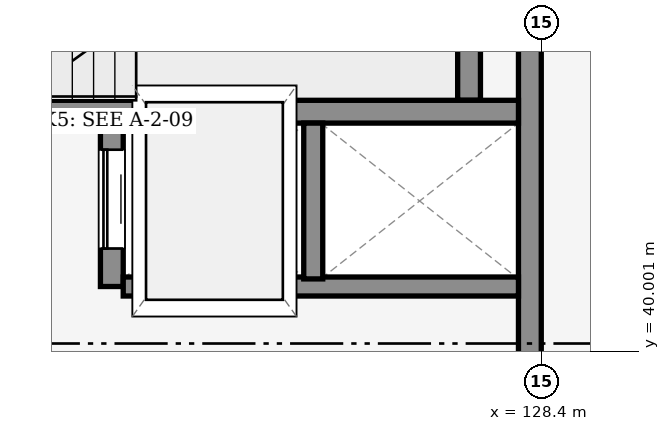
"""IFC4 building model, lengths in metres.
Left out: names, types, materials, properties, quantities, classifications, styles, units other than length and angle.
Written with IfcOpenShell. Run it as: python <this file> out.ifc"""

import sys

from ifc_helpers import new_model, si_unit, direction, frame, frame_2d, origin, place, context, subcontext, project, spatial, rectangle, extrude, element, fill, save


model = new_model("IFC4")
c1 = context("Model", 3, precision=1e-05, world=origin(), true_north=direction((0.0, 1.0)))
c2 = subcontext(c1, "Body", "Model", "MODEL_VIEW")
j1 = project(units=[si_unit("LENGTHUNIT", "METRE"), si_unit("PLANEANGLEUNIT", "RADIAN")], contexts=[c1])
p1 = place(None, origin())
s1 = spatial("IfcSite", under=j1, at=p1, CompositionType="ELEMENT")
p2 = place(p1, origin())
s2 = spatial("IfcBuilding", under=s1, at=p2, CompositionType="ELEMENT")
p3 = place(p2, origin())
s3 = spatial("IfcBuildingStorey", under=s2, at=p3, CompositionType="ELEMENT", Elevation=0.0)
p4 = place(p3, frame((128.25, 38.582, 0.0), z_axis=(0.0, 0.0, 1.0), x_axis=(0.0, 1.0, 0.0)))
e1 = element("IfcWall", 1, at=p4, inside=s3, PredefinedType="SHEAR", context=c2, shape_type="SweptSolid", body=[
    extrude(rectangle(XDim=8.036, YDim=0.3, at=frame_2d((4.018, 0.0))), origin(), (0.0, 0.0, 1.0), 5.18),
])
p5 = place(p3, frame((127.45, 43.3, 0.0), z_axis=(0.0, 0.0, 1.0), x_axis=(0.0, 1.0, 0.0)))
e2 = element("IfcWall", 2, at=p5, inside=s3, PredefinedType="SHEAR", context=c2, shape_type="SweptSolid", body=[
    extrude(rectangle(XDim=3.2, YDim=0.3, at=frame_2d((1.6, 0.0))), origin(), (0.0, 0.0, 1.0), 5.18),
])
p6 = place(p3, frame((116.7, 43.15, 0.0), z_axis=(0.0, 0.0, 1.0), x_axis=(1.0, 0.0, 0.0)))
e3 = element("IfcWall", 3, at=p6, inside=s3, PredefinedType="SHEAR", context=c2, shape_type="SweptSolid", body=[
    extrude(rectangle(XDim=11.4, YDim=0.3, at=frame_2d((5.7, 0.0))), origin(), (0.0, 0.0, 1.0), 5.18),
])
p7 = place(p6, frame((0.55, 0.0, 0.0)))
e4 = element("IfcOpeningElement", 4, at=p7, cuts=e3, PredefinedType="OPENING", context=c2, shape_type="SweptSolid", body=[
    extrude(rectangle(XDim=1.15, YDim=2.15, at=frame_2d((0.575, 1.075))), frame((0.0, 0.16, 0.0), z_axis=(0.0, -1.0, 0.0), x_axis=(1.0, 0.0, 0.0)), (0.0, 0.0, 1.0), 0.32),
])
p8 = place(p3, frame((122.75, 40.85, 0.0), z_axis=(0.0, 0.0, 1.0), x_axis=(0.0, 1.0, 0.0)))
e5 = element("IfcWall", 5, at=p8, inside=s3, PredefinedType="SHEAR", context=c2, shape_type="SweptSolid", body=[
    extrude(rectangle(XDim=2.15, YDim=0.3, at=frame_2d((1.075, 0.0))), origin(), (0.0, 0.0, 1.0), 5.18),
])
p9 = place(p8, frame((0.5, 0.0, 0.0)))
e6 = element("IfcOpeningElement", 6, at=p9, cuts=e5, PredefinedType="OPENING", context=c2, shape_type="SweptSolid", body=[
    extrude(rectangle(XDim=1.3, YDim=2.3, at=frame_2d((0.65, 1.15))), frame((0.0, 0.16, 0.0), z_axis=(0.0, -1.0, 0.0), x_axis=(1.0, 0.0, 0.0)), (0.0, 0.0, 1.0), 0.32),
])
p10 = place(p3, frame((122.9, 40.85, 0.0), z_axis=(0.0, 0.0, 1.0), x_axis=(1.0, 0.0, 0.0)))
e7 = element("IfcWall", 7, at=p10, inside=s3, PredefinedType="PARTITIONING", context=c2, shape_type="SweptSolid", body=[
    extrude(rectangle(XDim=5.2, YDim=0.25, at=frame_2d((2.6, 0.0))), origin(), (0.0, 0.0, 1.0), 4.325),
])
p11 = place(p3, frame((125.4, 40.95, 0.0), z_axis=(0.0, 0.0, 1.0), x_axis=(0.0, 1.0, 0.0)))
e8 = element("IfcWall", 8, at=p11, inside=s3, PredefinedType="PARTITIONING", context=c2, shape_type="SweptSolid", body=[
    extrude(rectangle(XDim=2.05, YDim=0.25, at=frame_2d((1.025, 0.0))), origin(), (0.0, 0.0, 1.0), 4.325),
])
p12 = place(p9, origin())
e9 = element("IfcDoor", 9, at=p12, inside=s3, OperationType="SLIDING_TO_LEFT", PredefinedType="DOOR", context=c2, shape_type="SweptSolid", body=[
    extrude(rectangle(XDim=1.3, YDim=2.3, at=frame_2d((0.65, 1.15))), frame((0.0, 0.025, 0.0), z_axis=(0.0, -1.0, 0.0), x_axis=(1.0, 0.0, 0.0)), (0.0, 0.0, 1.0), 0.05),
])
fill(e6, e9)
save(model, sys.argv[1])
